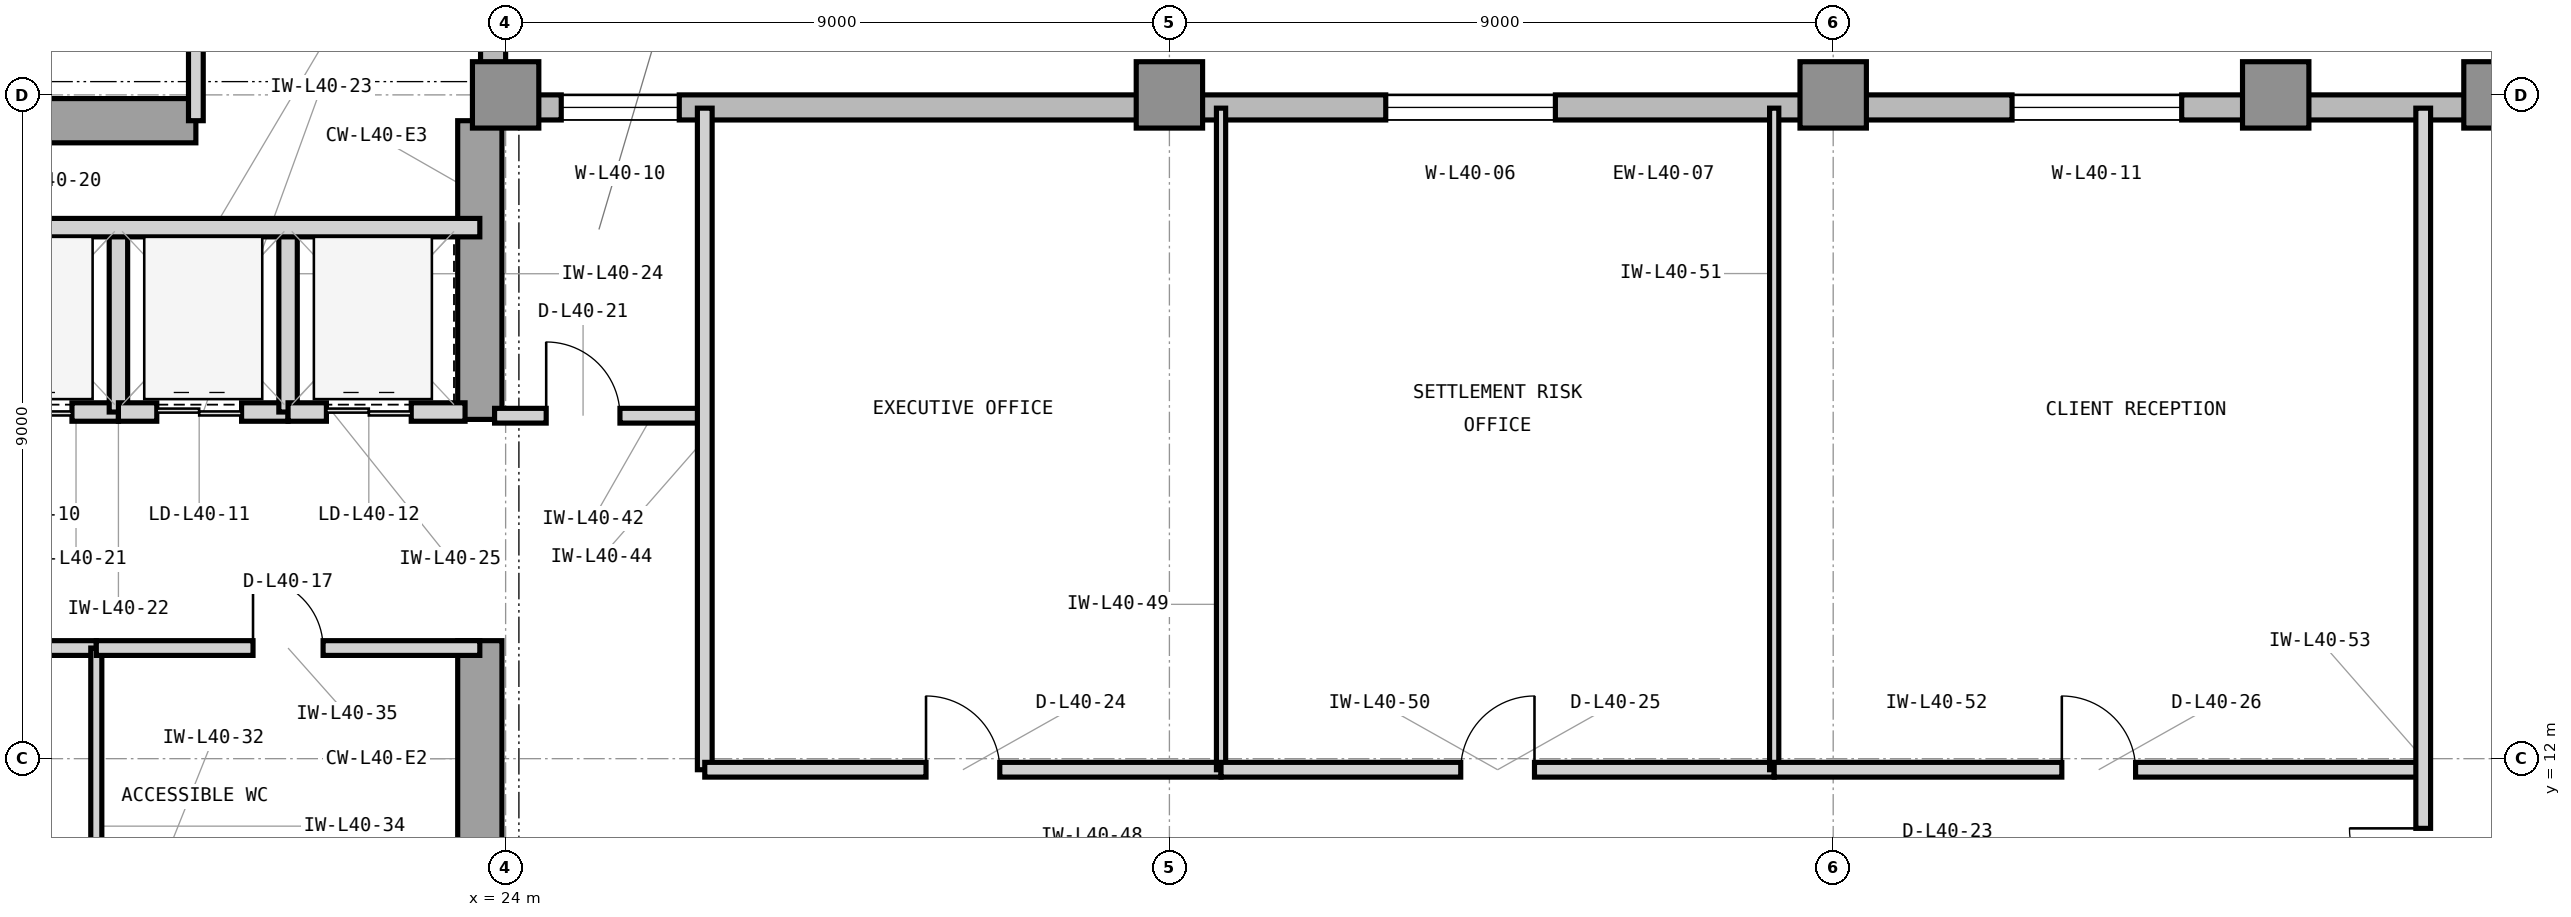
"""IFC4 building model, lengths in metres.
Left out: names, types, materials, properties, quantities, classifications, styles, units other than length and angle.
Written with IfcOpenShell. Run it as: python <this file> out.ifc"""

import sys

from ifc_helpers import new_model, si_unit, direction, frame, frame_2d, origin, origin_2d, place, context, subcontext, project, spatial, rectangle, extrude, element, fill, save


model = new_model("IFC4")
c1 = context("Model", 3, precision=1e-05, world=origin(), true_north=direction((0.0, 1.0)))
c2 = subcontext(c1, "Body", "Model", "MODEL_VIEW")
j1 = project(units=[si_unit("LENGTHUNIT", "METRE"), si_unit("PLANEANGLEUNIT", "RADIAN")], contexts=[c1])
p1 = place(None, origin())
s1 = spatial("IfcSite", under=j1, at=p1, CompositionType="ELEMENT")
p2 = place(p1, origin())
s2 = spatial("IfcBuilding", under=s1, at=p2, CompositionType="ELEMENT")
p3 = place(p2, frame((0.0, 0.0, 168.3)))
s3 = spatial("IfcBuildingStorey", under=s2, at=p3, CompositionType="ELEMENT", Elevation=168.3)
p4 = place(p3, frame((7.475, 20.65, 0.0), z_axis=(0.0, 0.0, 1.0), x_axis=(1.0, 0.0, 0.0)))
e1 = element("IfcWall", 1, at=p4, inside=s3, PredefinedType="SHEAR", context=c2, shape_type="SweptSolid", body=[
    extrude(rectangle(XDim=12.325, YDim=0.6, at=frame_2d((6.163, 0.0))), origin(), (0.0, 0.0, 1.0), 3.9),
])
p5 = place(p3, frame((23.65, 10.4, 0.0), z_axis=(0.0, 0.0, 1.0), x_axis=(0.0, 1.0, 0.0)))
e2 = element("IfcWall", 2, at=p5, inside=s3, PredefinedType="SHEAR", context=c2, shape_type="SweptSolid", body=[
    extrude(rectangle(XDim=3.2, YDim=0.6, at=frame_2d((1.6, 0.0))), origin(), (0.0, 0.0, 1.0), 3.9),
])
p6 = place(p3, frame((23.65, 16.6, 0.0), z_axis=(0.0, 0.0, 1.0), x_axis=(0.0, 1.0, 0.0)))
e3 = element("IfcWall", 3, at=p6, inside=s3, PredefinedType="SHEAR", context=c2, shape_type="SweptSolid", body=[
    extrude(rectangle(XDim=4.05, YDim=0.6, at=frame_2d((2.025, 0.0))), origin(), (0.0, 0.0, 1.0), 3.9),
])
for number, where, z_axis, x_axis in (
    (4, (24.0, 21.0, 0.0), (0.0, 0.0, 1.0), (1.0, 0.0, 0.0)),
    (5, (33.0, 21.0, 0.0), (0.0, 0.0, 1.0), (1.0, 0.0, 0.0)),
    (6, (42.0, 21.0, 0.0), (0.0, 0.0, 1.0), (1.0, 0.0, 0.0)),
    (7, (48.0, 21.0, 0.0), (0.0, 0.0, 1.0), (1.0, 0.0, 0.0)),
    (8, (51.0, 21.0, 0.0), (0.0, 0.0, 1.0), (1.0, 0.0, 0.0)),
):
    element("IfcColumn", number, at=place(p3, frame(where, z_axis=z_axis, x_axis=x_axis)), inside=s3, PredefinedType="COLUMN", context=c2, shape_type="SweptSolid", body=[
        extrude(rectangle(XDim=0.9, YDim=0.9, at=origin_2d()), origin(), (0.0, 0.0, 1.0), 3.9),
    ])
p7 = place(p3, frame((55.4, 20.83, 0.0), z_axis=(0.0, 0.0, 1.0), x_axis=(-1.0, 0.0, 0.0)))
e9 = element("IfcWall", 9, at=p7, inside=s3, PredefinedType="STANDARD", context=c2, shape_type="SweptSolid", body=[
    extrude(rectangle(XDim=31.4, YDim=0.34, at=frame_2d((15.7, 0.0))), origin(), (0.0, 0.0, 1.0), 3.7),
])
p8 = place(p7, frame((17.167, 0.0, 0.9)))
e10 = element("IfcOpeningElement", 10, at=p8, cuts=e9, PredefinedType="OPENING", context=c2, shape_type="SweptSolid", body=[
    extrude(rectangle(XDim=2.3, YDim=2.2, at=frame_2d((1.15, 1.1))), frame((0.0, 0.18, 0.0), z_axis=(0.0, -1.0, 0.0), x_axis=(1.0, 0.0, 0.0)), (0.0, 0.0, 1.0), 0.36),
])
p9 = place(p7, frame((29.046, 0.0, 0.9)))
e11 = element("IfcOpeningElement", 11, at=p9, cuts=e9, PredefinedType="OPENING", context=c2, shape_type="SweptSolid", body=[
    extrude(rectangle(XDim=1.6, YDim=2.2, at=frame_2d((0.8, 1.1))), frame((0.0, 0.18, 0.0), z_axis=(0.0, -1.0, 0.0), x_axis=(1.0, 0.0, 0.0)), (0.0, 0.0, 1.0), 0.36),
])
p10 = place(p7, frame((8.675, 0.0, 0.9)))
e12 = element("IfcOpeningElement", 12, at=p10, cuts=e9, PredefinedType="OPENING", context=c2, shape_type="SweptSolid", body=[
    extrude(rectangle(XDim=2.3, YDim=2.2, at=frame_2d((1.15, 1.1))), frame((0.0, 0.18, 0.0), z_axis=(0.0, -1.0, 0.0), x_axis=(1.0, 0.0, 0.0)), (0.0, 0.0, 1.0), 0.36),
])
p11 = place(p3, frame((23.83, 21.0, 0.0), z_axis=(0.0, 0.0, 1.0), x_axis=(0.0, 1.0, 0.0)))
e13 = element("IfcWall", 13, at=p11, inside=s3, PredefinedType="STANDARD", context=c2, shape_type="SweptSolid", body=[
    extrude(rectangle(XDim=22.4, YDim=0.34, at=frame_2d((11.2, 0.0))), origin(), (0.0, 0.0, 1.0), 3.7),
])
p12 = place(p3, frame((16.45, 16.7, 0.0), z_axis=(0.0, 0.0, 1.0), x_axis=(1.0, 0.0, 0.0)))
e14 = element("IfcWall", 14, at=p12, inside=s3, PredefinedType="PARTITIONING", context=c2, shape_type="SweptSolid", body=[
    extrude(rectangle(XDim=2.3, YDim=0.25, at=frame_2d((1.15, 0.0))), origin(), (0.0, 0.0, 1.0), 3.283),
])
p13 = place(p12, frame((0.52, 0.0, 0.0)))
e15 = element("IfcOpeningElement", 15, at=p13, cuts=e14, PredefinedType="OPENING", context=c2, shape_type="SweptSolid", body=[
    extrude(rectangle(XDim=1.15, YDim=2.25, at=frame_2d((0.575, 1.125))), frame((0.0, 0.135, 0.0), z_axis=(0.0, -1.0, 0.0), x_axis=(1.0, 0.0, 0.0)), (0.0, 0.0, 1.0), 0.27),
])
p14 = place(p3, frame((18.75, 16.7, 0.0), z_axis=(0.0, 0.0, 1.0), x_axis=(0.0, 1.0, 0.0)))
e16 = element("IfcWall", 16, at=p14, inside=s3, PredefinedType="PARTITIONING", context=c2, shape_type="SweptSolid", body=[
    extrude(rectangle(XDim=2.5, YDim=0.25, at=frame_2d((1.25, 0.0))), origin(), (0.0, 0.0, 1.0), 3.69),
])
p15 = place(p3, frame((18.75, 16.7, 0.0), z_axis=(0.0, 0.0, 1.0), x_axis=(1.0, 0.0, 0.0)))
e17 = element("IfcWall", 17, at=p15, inside=s3, PredefinedType="PARTITIONING", context=c2, shape_type="SweptSolid", body=[
    extrude(rectangle(XDim=2.3, YDim=0.25, at=frame_2d((1.15, 0.0))), origin(), (0.0, 0.0, 1.0), 3.283),
])
p16 = place(p15, frame((0.52, 0.0, 0.0)))
e18 = element("IfcOpeningElement", 18, at=p16, cuts=e17, PredefinedType="OPENING", context=c2, shape_type="SweptSolid", body=[
    extrude(rectangle(XDim=1.15, YDim=2.25, at=frame_2d((0.575, 1.125))), frame((0.0, 0.135, 0.0), z_axis=(0.0, -1.0, 0.0), x_axis=(1.0, 0.0, 0.0)), (0.0, 0.0, 1.0), 0.27),
])
p17 = place(p3, frame((21.05, 16.7, 0.0), z_axis=(0.0, 0.0, 1.0), x_axis=(0.0, 1.0, 0.0)))
e19 = element("IfcWall", 19, at=p17, inside=s3, PredefinedType="PARTITIONING", context=c2, shape_type="SweptSolid", body=[
    extrude(rectangle(XDim=2.5, YDim=0.25, at=frame_2d((1.25, 0.0))), origin(), (0.0, 0.0, 1.0), 3.69),
])
p18 = place(p3, frame((21.05, 16.7, 0.0), z_axis=(0.0, 0.0, 1.0), x_axis=(1.0, 0.0, 0.0)))
e20 = element("IfcWall", 20, at=p18, inside=s3, PredefinedType="PARTITIONING", context=c2, shape_type="SweptSolid", body=[
    extrude(rectangle(XDim=2.4, YDim=0.25, at=frame_2d((1.2, 0.0))), origin(), (0.0, 0.0, 1.0), 3.283),
])
p19 = place(p18, frame((0.52, 0.0, 0.0)))
e21 = element("IfcOpeningElement", 21, at=p19, cuts=e20, PredefinedType="OPENING", context=c2, shape_type="SweptSolid", body=[
    extrude(rectangle(XDim=1.15, YDim=2.25, at=frame_2d((0.575, 1.125))), frame((0.0, 0.135, 0.0), z_axis=(0.0, -1.0, 0.0), x_axis=(1.0, 0.0, 0.0)), (0.0, 0.0, 1.0), 0.27),
])
p20 = place(p3, frame((16.45, 19.2, 0.0), z_axis=(0.0, 0.0, 1.0), x_axis=(1.0, 0.0, 0.0)))
e22 = element("IfcWall", 22, at=p20, inside=s3, PredefinedType="PARTITIONING", context=c2, shape_type="SweptSolid", body=[
    extrude(rectangle(XDim=7.2, YDim=0.25, at=frame_2d((3.6, 0.0))), origin(), (0.0, 0.0, 1.0), 3.69),
])
p21 = place(p3, frame((14.7, 13.5, 0.0), z_axis=(0.0, 0.0, 1.0), x_axis=(1.0, 0.0, 0.0)))
e23 = element("IfcWall", 23, at=p21, inside=s3, PredefinedType="PARTITIONING", context=c2, shape_type="SweptSolid", body=[
    extrude(rectangle(XDim=3.75, YDim=0.2, at=frame_2d((1.875, 0.0))), origin(), (0.0, 0.0, 1.0), 3.283),
])
p22 = place(p21, frame((1.4, 0.0, 0.0)))
e24 = element("IfcOpeningElement", 24, at=p22, cuts=e23, PredefinedType="OPENING", context=c2, shape_type="SweptSolid", body=[
    extrude(rectangle(XDim=0.95, YDim=2.1, at=frame_2d((0.475, 1.05))), frame((0.0, 0.11, 0.0), z_axis=(0.0, -1.0, 0.0), x_axis=(1.0, 0.0, 0.0)), (0.0, 0.0, 1.0), 0.22),
])
p23 = place(p3, frame((18.45, 10.28, 0.0), z_axis=(0.0, 0.0, 1.0), x_axis=(0.0, 1.0, 0.0)))
e25 = element("IfcWall", 25, at=p23, inside=s3, PredefinedType="PARTITIONING", context=c2, shape_type="SweptSolid", body=[
    extrude(rectangle(XDim=3.22, YDim=0.15, at=frame_2d((1.61, 0.0))), origin(), (0.0, 0.0, 1.0), 3.69),
])
p24 = place(p3, frame((18.45, 13.5, 0.0), z_axis=(0.0, 0.0, 1.0), x_axis=(1.0, 0.0, 0.0)))
e26 = element("IfcWall", 26, at=p24, inside=s3, PredefinedType="PARTITIONING", context=c2, shape_type="SweptSolid", body=[
    extrude(rectangle(XDim=5.2, YDim=0.2, at=frame_2d((2.6, 0.0))), origin(), (0.0, 0.0, 1.0), 3.283),
])
p25 = place(p24, frame((2.125, 0.0, 0.0)))
e27 = element("IfcOpeningElement", 27, at=p25, cuts=e26, PredefinedType="OPENING", context=c2, shape_type="SweptSolid", body=[
    extrude(rectangle(XDim=0.95, YDim=2.1, at=frame_2d((0.475, 1.05))), frame((0.0, 0.11, 0.0), z_axis=(0.0, -1.0, 0.0), x_axis=(1.0, 0.0, 0.0)), (0.0, 0.0, 1.0), 0.22),
])
p26 = place(p3, frame((23.85, 16.65, 0.0), z_axis=(0.0, 0.0, 1.0), x_axis=(1.0, 0.0, 0.0)))
e28 = element("IfcWall", 28, at=p26, inside=s3, PredefinedType="PARTITIONING", context=c2, shape_type="SweptSolid", body=[
    extrude(rectangle(XDim=2.85, YDim=0.2, at=frame_2d((1.425, 0.0))), origin(), (0.0, 0.0, 1.0), 3.69),
])
p27 = place(p26, frame((0.7, 0.0, 0.0)))
e29 = element("IfcOpeningElement", 29, at=p27, cuts=e28, PredefinedType="OPENING", context=c2, shape_type="SweptSolid", body=[
    extrude(rectangle(XDim=1.0, YDim=2.15, at=frame_2d((0.5, 1.075))), frame((0.0, 0.11, 0.0), z_axis=(0.0, -1.0, 0.0), x_axis=(1.0, 0.0, 0.0)), (0.0, 0.0, 1.0), 0.22),
])
p28 = place(p3, frame((26.7, 11.85, 0.0), z_axis=(0.0, 0.0, 1.0), x_axis=(0.0, 1.0, 0.0)))
e30 = element("IfcWall", 30, at=p28, inside=s3, PredefinedType="PARTITIONING", context=c2, shape_type="SweptSolid", body=[
    extrude(rectangle(XDim=8.97, YDim=0.2, at=frame_2d((4.485, 0.0))), origin(), (0.0, 0.0, 1.0), 3.69),
])
p29 = place(p3, frame((26.7, 11.85, 0.0), z_axis=(0.0, 0.0, 1.0), x_axis=(1.0, 0.0, 0.0)))
e31 = element("IfcWall", 31, at=p29, inside=s3, PredefinedType="PARTITIONING", context=c2, shape_type="SweptSolid", body=[
    extrude(rectangle(XDim=7.0, YDim=0.2, at=frame_2d((3.5, 0.0))), origin(), (0.0, 0.0, 1.0), 3.69),
])
p30 = place(p29, frame((3.0, 0.0, 0.0)))
e32 = element("IfcOpeningElement", 32, at=p30, cuts=e31, PredefinedType="OPENING", context=c2, shape_type="SweptSolid", body=[
    extrude(rectangle(XDim=1.0, YDim=2.15, at=frame_2d((0.5, 1.075))), frame((0.0, 0.11, 0.0), z_axis=(0.0, -1.0, 0.0), x_axis=(1.0, 0.0, 0.0)), (0.0, 0.0, 1.0), 0.22),
])
p31 = place(p3, frame((33.7, 11.85, 0.0), z_axis=(0.0, 0.0, 1.0), x_axis=(0.0, 1.0, 0.0)))
e33 = element("IfcWall", 33, at=p31, inside=s3, PredefinedType="PARTITIONING", context=c2, shape_type="SweptSolid", body=[
    extrude(rectangle(XDim=8.97, YDim=0.125, at=frame_2d((4.485, 0.0))), origin(), (0.0, 0.0, 1.0), 3.69),
])
p32 = place(p3, frame((33.7, 11.85, 0.0), z_axis=(0.0, 0.0, 1.0), x_axis=(1.0, 0.0, 0.0)))
e34 = element("IfcWall", 34, at=p32, inside=s3, PredefinedType="PARTITIONING", context=c2, shape_type="SweptSolid", body=[
    extrude(rectangle(XDim=7.5, YDim=0.2, at=frame_2d((3.75, 0.0))), origin(), (0.0, 0.0, 1.0), 3.69),
])
p33 = place(p32, frame((3.25, 0.0, 0.0)))
e35 = element("IfcOpeningElement", 35, at=p33, cuts=e34, PredefinedType="OPENING", context=c2, shape_type="SweptSolid", body=[
    extrude(rectangle(XDim=1.0, YDim=2.15, at=frame_2d((0.5, 1.075))), frame((0.0, 0.11, 0.0), z_axis=(0.0, -1.0, 0.0), x_axis=(1.0, 0.0, 0.0)), (0.0, 0.0, 1.0), 0.22),
])
p34 = place(p3, frame((41.2, 11.85, 0.0), z_axis=(0.0, 0.0, 1.0), x_axis=(0.0, 1.0, 0.0)))
e36 = element("IfcWall", 36, at=p34, inside=s3, PredefinedType="PARTITIONING", context=c2, shape_type="SweptSolid", body=[
    extrude(rectangle(XDim=8.97, YDim=0.125, at=frame_2d((4.485, 0.0))), origin(), (0.0, 0.0, 1.0), 3.69),
])
p35 = place(p3, frame((41.2, 11.85, 0.0), z_axis=(0.0, 0.0, 1.0), x_axis=(1.0, 0.0, 0.0)))
e37 = element("IfcWall", 37, at=p35, inside=s3, PredefinedType="PARTITIONING", context=c2, shape_type="SweptSolid", body=[
    extrude(rectangle(XDim=8.8, YDim=0.2, at=frame_2d((4.4, 0.0))), origin(), (0.0, 0.0, 1.0), 3.69),
])
p36 = place(p35, frame((3.9, 0.0, 0.0)))
e38 = element("IfcOpeningElement", 38, at=p36, cuts=e37, PredefinedType="OPENING", context=c2, shape_type="SweptSolid", body=[
    extrude(rectangle(XDim=1.0, YDim=2.15, at=frame_2d((0.5, 1.075))), frame((0.0, 0.11, 0.0), z_axis=(0.0, -1.0, 0.0), x_axis=(1.0, 0.0, 0.0)), (0.0, 0.0, 1.0), 0.22),
])
p37 = place(p3, frame((50.0, 3.18, 0.0), z_axis=(0.0, 0.0, 1.0), x_axis=(0.0, 1.0, 0.0)))
e39 = element("IfcWall", 39, at=p37, inside=s3, PredefinedType="PARTITIONING", context=c2, shape_type="SweptSolid", body=[
    extrude(rectangle(XDim=17.64, YDim=0.2, at=frame_2d((8.82, 0.0))), origin(), (0.0, 0.0, 1.0), 3.69),
])
p38 = place(p37, frame((6.875, 0.0, 0.0)))
e40 = element("IfcOpeningElement", 40, at=p38, cuts=e39, PredefinedType="OPENING", context=c2, shape_type="SweptSolid", body=[
    extrude(rectangle(XDim=1.0, YDim=2.15, at=frame_2d((0.5, 1.075))), frame((0.0, 0.11, 0.0), z_axis=(0.0, -1.0, 0.0), x_axis=(1.0, 0.0, 0.0)), (0.0, 0.0, 1.0), 0.22),
])
p39 = place(p3, frame((19.8, 20.65, 0.0), z_axis=(0.0, 0.0, 1.0), x_axis=(0.0, 1.0, 0.0)))
e41 = element("IfcWall", 41, at=p39, inside=s3, PredefinedType="PARTITIONING", context=c2, shape_type="SweptSolid", body=[
    extrude(rectangle(XDim=6.15, YDim=0.2, at=frame_2d((3.075, 0.0))), origin(), (0.0, 0.0, 1.0), 3.69),
])
p40 = place(p8, origin())
e42 = element("IfcWindow", 42, at=p40, inside=s3, PartitioningType="SINGLE_PANEL", PredefinedType="WINDOW", context=c2, shape_type="SweptSolid", body=[
    extrude(rectangle(XDim=2.3, YDim=2.2, at=frame_2d((1.15, 1.1))), frame((0.0, 0.11, 0.0), z_axis=(0.0, -1.0, 0.0), x_axis=(1.0, 0.0, 0.0)), (0.0, 0.0, 1.0), 0.06),
])
fill(e10, e42)
p41 = place(p13, origin())
e43 = element("IfcDoor", 43, at=p41, inside=s3, OperationType="DOUBLE_DOOR_SLIDING", PredefinedType="DOOR", context=c2, shape_type="SweptSolid", body=[
    extrude(rectangle(XDim=1.15, YDim=2.25, at=frame_2d((0.575, 1.125))), frame((0.0, 0.025, 0.0), z_axis=(0.0, -1.0, 0.0), x_axis=(1.0, 0.0, 0.0)), (0.0, 0.0, 1.0), 0.05),
])
fill(e15, e43)
p42 = place(p16, origin())
e44 = element("IfcDoor", 44, at=p42, inside=s3, OperationType="DOUBLE_DOOR_SLIDING", PredefinedType="DOOR", context=c2, shape_type="SweptSolid", body=[
    extrude(rectangle(XDim=1.15, YDim=2.25, at=frame_2d((0.575, 1.125))), frame((0.0, 0.025, 0.0), z_axis=(0.0, -1.0, 0.0), x_axis=(1.0, 0.0, 0.0)), (0.0, 0.0, 1.0), 0.05),
])
fill(e18, e44)
p43 = place(p19, origin())
e45 = element("IfcDoor", 45, at=p43, inside=s3, OperationType="DOUBLE_DOOR_SLIDING", PredefinedType="DOOR", context=c2, shape_type="SweptSolid", body=[
    extrude(rectangle(XDim=1.15, YDim=2.25, at=frame_2d((0.575, 1.125))), frame((0.0, 0.025, 0.0), z_axis=(0.0, -1.0, 0.0), x_axis=(1.0, 0.0, 0.0)), (0.0, 0.0, 1.0), 0.05),
])
fill(e21, e45)
p44 = place(p25, origin())
e46 = element("IfcDoor", 46, at=p44, inside=s3, OperationType="SINGLE_SWING_LEFT", PredefinedType="DOOR", context=c2, shape_type="SweptSolid", body=[
    extrude(rectangle(XDim=0.95, YDim=2.1, at=frame_2d((0.475, 1.05))), frame((0.0, 0.025, 0.0), z_axis=(0.0, -1.0, 0.0), x_axis=(1.0, 0.0, 0.0)), (0.0, 0.0, 1.0), 0.05),
])
fill(e27, e46)
p45 = place(p27, origin())
e47 = element("IfcDoor", 47, at=p45, inside=s3, OperationType="SINGLE_SWING_LEFT", PredefinedType="DOOR", context=c2, shape_type="SweptSolid", body=[
    extrude(rectangle(XDim=1.0, YDim=2.15, at=frame_2d((0.5, 1.075))), frame((0.0, 0.025, 0.0), z_axis=(0.0, -1.0, 0.0), x_axis=(1.0, 0.0, 0.0)), (0.0, 0.0, 1.0), 0.05),
])
fill(e29, e47)
p46 = place(p30, origin())
e48 = element("IfcDoor", 48, at=p46, inside=s3, OperationType="SINGLE_SWING_LEFT", PredefinedType="DOOR", context=c2, shape_type="SweptSolid", body=[
    extrude(rectangle(XDim=1.0, YDim=2.15, at=frame_2d((0.5, 1.075))), frame((0.0, 0.025, 0.0), z_axis=(0.0, -1.0, 0.0), x_axis=(1.0, 0.0, 0.0)), (0.0, 0.0, 1.0), 0.05),
])
fill(e32, e48)
p47 = place(p33, origin())
e49 = element("IfcDoor", 49, at=p47, inside=s3, OperationType="SINGLE_SWING_RIGHT", PredefinedType="DOOR", context=c2, shape_type="SweptSolid", body=[
    extrude(rectangle(XDim=1.0, YDim=2.15, at=frame_2d((0.5, 1.075))), frame((0.0, 0.025, 0.0), z_axis=(0.0, -1.0, 0.0), x_axis=(1.0, 0.0, 0.0)), (0.0, 0.0, 1.0), 0.05),
])
fill(e35, e49)
p48 = place(p36, origin())
e50 = element("IfcDoor", 50, at=p48, inside=s3, OperationType="SINGLE_SWING_LEFT", PredefinedType="DOOR", context=c2, shape_type="SweptSolid", body=[
    extrude(rectangle(XDim=1.0, YDim=2.15, at=frame_2d((0.5, 1.075))), frame((0.0, 0.025, 0.0), z_axis=(0.0, -1.0, 0.0), x_axis=(1.0, 0.0, 0.0)), (0.0, 0.0, 1.0), 0.05),
])
fill(e38, e50)
p49 = place(p38, origin())
e51 = element("IfcDoor", 51, at=p49, inside=s3, OperationType="SINGLE_SWING_RIGHT", PredefinedType="DOOR", context=c2, shape_type="SweptSolid", body=[
    extrude(rectangle(XDim=1.0, YDim=2.15, at=frame_2d((0.5, 1.075))), frame((0.0, 0.025, 0.0), z_axis=(0.0, -1.0, 0.0), x_axis=(1.0, 0.0, 0.0)), (0.0, 0.0, 1.0), 0.05),
])
fill(e40, e51)
p50 = place(p9, origin())
e52 = element("IfcWindow", 52, at=p50, inside=s3, PartitioningType="SINGLE_PANEL", PredefinedType="WINDOW", context=c2, shape_type="SweptSolid", body=[
    extrude(rectangle(XDim=1.6, YDim=2.2, at=frame_2d((0.8, 1.1))), frame((0.0, 0.11, 0.0), z_axis=(0.0, -1.0, 0.0), x_axis=(1.0, 0.0, 0.0)), (0.0, 0.0, 1.0), 0.06),
])
fill(e11, e52)
p51 = place(p10, origin())
e53 = element("IfcWindow", 53, at=p51, inside=s3, PartitioningType="SINGLE_PANEL", PredefinedType="WINDOW", context=c2, shape_type="SweptSolid", body=[
    extrude(rectangle(XDim=2.3, YDim=2.2, at=frame_2d((1.15, 1.1))), frame((0.0, 0.11, 0.0), z_axis=(0.0, -1.0, 0.0), x_axis=(1.0, 0.0, 0.0)), (0.0, 0.0, 1.0), 0.06),
])
fill(e12, e53)
save(model, sys.argv[1])
